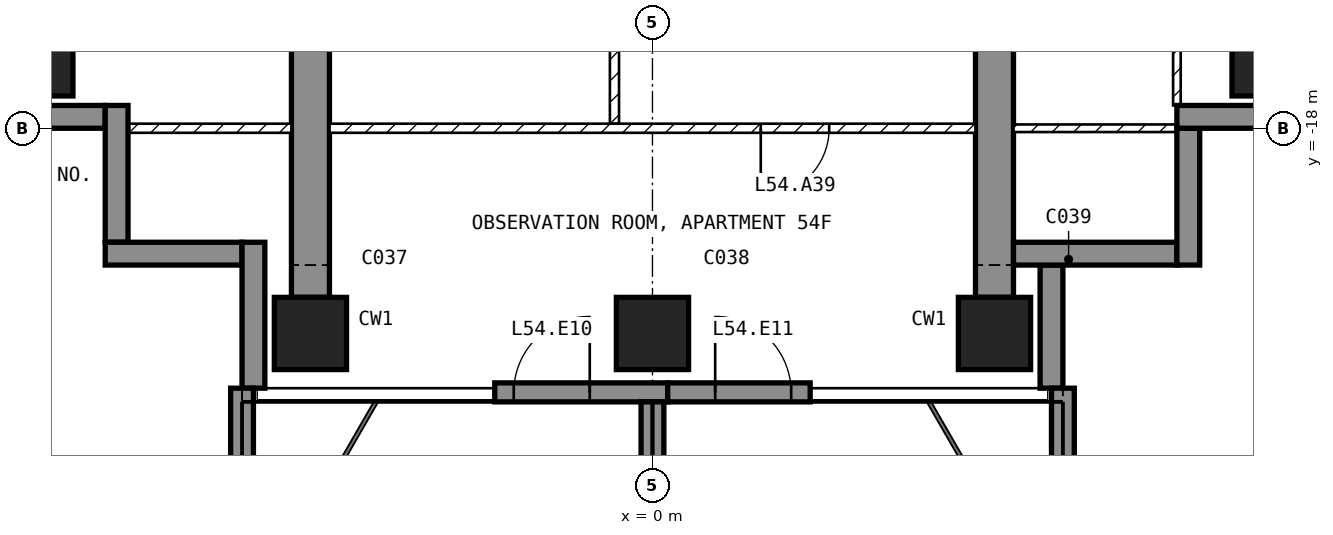
"""IFC4 building model, lengths in metres.
Left out: names, types, materials, properties, quantities, classifications, styles, units other than length and angle.
Written with IfcOpenShell. Run it as: python <this file> out.ifc"""

import sys

from ifc_helpers import new_model, si_unit, direction, frame, frame_2d, origin, origin_2d, place, context, subcontext, project, spatial, polyline, rectangle, outline, extrude, element, fill, save


model = new_model("IFC4")
c1 = context("Model", 3, precision=1e-05, world=origin(), true_north=direction((0.0, 1.0)))
c2 = subcontext(c1, "Body", "Model", "MODEL_VIEW")
j1 = project(units=[si_unit("LENGTHUNIT", "METRE"), si_unit("PLANEANGLEUNIT", "RADIAN")], contexts=[c1])
p1 = place(None, origin())
s1 = spatial("IfcSite", under=j1, at=p1, CompositionType="ELEMENT")
p2 = place(p1, origin())
s2 = spatial("IfcBuilding", under=s1, at=p2, CompositionType="ELEMENT")
p3 = place(p2, frame((0.0, 0.0, 215.6)))
s3 = spatial("IfcBuildingStorey", under=s2, at=p3, CompositionType="ELEMENT", Elevation=215.6)
for number, where, z_axis, x_axis in (
    (1, (-8.1, -17.1, -0.25), (0.0, 0.0, 1.0), (1.0, 0.0, 0.0)),
    (2, (-4.5, -20.7, -0.25), (0.0, 0.0, 1.0), (1.0, 0.0, 0.0)),
    (3, (0.0, -20.7, -0.25), (0.0, 0.0, 1.0), (1.0, 0.0, 0.0)),
    (4, (4.5, -20.7, -0.25), (0.0, 0.0, 1.0), (1.0, 0.0, 0.0)),
    (5, (8.1, -17.1, -0.25), (0.0, 0.0, 1.0), (1.0, 0.0, 0.0)),
):
    element("IfcColumn", number, at=place(p3, frame(where, z_axis=z_axis, x_axis=x_axis)), inside=s3, PredefinedType="COLUMN", context=c2, shape_type="SweptSolid", body=[
        extrude(rectangle(XDim=0.95, YDim=0.95, at=origin_2d()), origin(), (0.0, 0.0, 1.0), 3.5),
    ])
for number, where, z_axis, x_axis in (
    (6, (-4.75, -20.225, -0.25), (1.0, 0.0, 0.0), (0.0, 1.0, 0.0)),
    (7, (4.25, -20.225, -0.25), (1.0, 0.0, 0.0), (0.0, 1.0, 0.0)),
):
    element("IfcWall", number, at=place(p3, frame(where, z_axis=z_axis, x_axis=x_axis)), inside=s3, PredefinedType="SHEAR", context=c2, shape_type="SweptSolid", body=[
        extrude(outline(polyline([(0.0, 0.0), (6.725, 0.0), (6.725, 2.65), (9.125, 2.65), (9.125, 0.0), (11.225, 0.0), (11.225, 3.5), (0.0, 3.5), (0.0, 0.0)])), origin(), (0.0, 0.0, 1.0), 0.5),
    ])
p4 = place(p3, frame((-2.075, -21.475, 0.0), z_axis=(0.0, 0.0, 1.0), x_axis=(1.0, 0.0, 0.0)))
e8 = element("IfcWall", 8, at=p4, inside=s3, PredefinedType="SOLIDWALL", context=c2, shape_type="SweptSolid", body=[
    extrude(rectangle(XDim=2.275, YDim=0.25, at=frame_2d((1.137, 0.0))), origin(), (0.0, 0.0, 1.0), 3.25),
])
p5 = place(p4, frame((0.25, 0.0, 0.0)))
e9 = element("IfcOpeningElement", 9, at=p5, cuts=e8, PredefinedType="OPENING", context=c2, shape_type="SweptSolid", body=[
    extrude(rectangle(XDim=1.0, YDim=2.4, at=frame_2d((0.5, 1.2))), frame((0.0, 0.135, 0.0), z_axis=(0.0, -1.0, 0.0), x_axis=(1.0, 0.0, 0.0)), (0.0, 0.0, 1.0), 0.27),
])
p6 = place(p3, frame((0.2, -21.475, 0.0), z_axis=(0.0, 0.0, 1.0), x_axis=(1.0, 0.0, 0.0)))
e10 = element("IfcWall", 10, at=p6, inside=s3, PredefinedType="SOLIDWALL", context=c2, shape_type="SweptSolid", body=[
    extrude(rectangle(XDim=1.875, YDim=0.25, at=frame_2d((0.938, 0.0))), origin(), (0.0, 0.0, 1.0), 3.25),
])
p7 = place(p6, frame((0.625, 0.0, 0.0)))
e11 = element("IfcOpeningElement", 11, at=p7, cuts=e10, PredefinedType="OPENING", context=c2, shape_type="SweptSolid", body=[
    extrude(rectangle(XDim=1.0, YDim=2.4, at=frame_2d((0.5, 1.2))), frame((0.0, 0.135, 0.0), z_axis=(0.0, -1.0, 0.0), x_axis=(1.0, 0.0, 0.0)), (0.0, 0.0, 1.0), 0.27),
])
p8 = place(p3, frame((5.25, -21.42, 0.0), z_axis=(0.0, 0.0, 1.0), x_axis=(0.0, 1.0, 0.0)))
e12 = element("IfcWall", 12, at=p8, inside=s3, PredefinedType="SOLIDWALL", context=c2, shape_type="SweptSolid", body=[
    extrude(rectangle(XDim=1.62, YDim=0.3, at=frame_2d((0.81, 0.0))), origin(), (0.0, 0.0, 1.0), 3.25),
])
p9 = place(p3, frame((4.75, -19.65, 0.0), z_axis=(0.0, 0.0, 1.0), x_axis=(1.0, 0.0, 0.0)))
e13 = element("IfcWall", 13, at=p9, inside=s3, PredefinedType="SOLIDWALL", context=c2, shape_type="SweptSolid", body=[
    extrude(rectangle(XDim=2.15, YDim=0.3, at=frame_2d((1.075, 0.0))), origin(), (0.0, 0.0, 1.0), 3.25),
])
p10 = place(p3, frame((7.05, -19.8, 0.0), z_axis=(0.0, 0.0, 1.0), x_axis=(0.0, 1.0, 0.0)))
e14 = element("IfcWall", 14, at=p10, inside=s3, PredefinedType="SOLIDWALL", context=c2, shape_type="SweptSolid", body=[
    extrude(rectangle(XDim=1.8, YDim=0.3, at=frame_2d((0.9, 0.0))), origin(), (0.0, 0.0, 1.0), 3.25),
])
p11 = place(p3, frame((6.9, -17.85, 0.0), z_axis=(0.0, 0.0, 1.0), x_axis=(1.0, 0.0, 0.0)))
e15 = element("IfcWall", 15, at=p11, inside=s3, PredefinedType="SOLIDWALL", context=c2, shape_type="SweptSolid", body=[
    extrude(rectangle(XDim=1.85, YDim=0.3, at=frame_2d((0.925, 0.0))), origin(), (0.0, 0.0, 1.0), 3.25),
])
p12 = place(p3, frame((-8.75, -17.85, 0.0), z_axis=(0.0, 0.0, 1.0), x_axis=(1.0, 0.0, 0.0)))
e16 = element("IfcWall", 16, at=p12, inside=s3, PredefinedType="SOLIDWALL", context=c2, shape_type="SweptSolid", body=[
    extrude(rectangle(XDim=1.55, YDim=0.3, at=frame_2d((0.775, 0.0))), origin(), (0.0, 0.0, 1.0), 3.25),
])
for number, where, z_axis, x_axis in (
    (17, (-7.05, -17.7, 0.0), (0.0, 0.0, 1.0), (0.0, -1.0, 0.0)),
    (18, (-7.2, -19.65, 0.0), (0.0, 0.0, 1.0), (1.0, 0.0, 0.0)),
):
    element("IfcWall", number, at=place(p3, frame(where, z_axis=z_axis, x_axis=x_axis)), inside=s3, PredefinedType="SOLIDWALL", context=c2, shape_type="SweptSolid", body=[
        extrude(rectangle(XDim=1.8, YDim=0.3, at=frame_2d((0.9, 0.0))), origin(), (0.0, 0.0, 1.0), 3.25),
    ])
p13 = place(p3, frame((-5.25, -19.5, 0.0), z_axis=(0.0, 0.0, 1.0), x_axis=(0.0, -1.0, 0.0)))
e19 = element("IfcWall", 19, at=p13, inside=s3, PredefinedType="SOLIDWALL", context=c2, shape_type="SweptSolid", body=[
    extrude(rectangle(XDim=1.92, YDim=0.3, at=frame_2d((0.96, 0.0))), origin(), (0.0, 0.0, 1.0), 3.25),
])
p14 = place(p3, frame((-5.4, -21.42, 0.0), z_axis=(0.0, 0.0, 1.0), x_axis=(0.0, -1.0, 0.0)))
e20 = element("IfcWall", 20, at=p14, inside=s3, PredefinedType="SOLIDWALL", context=c2, shape_type="SweptSolid", body=[
    extrude(rectangle(XDim=2.88, YDim=0.3, at=frame_2d((1.44, 0.0))), origin(), (0.0, 0.0, 1.0), 3.25),
])
p15 = place(p3, frame((0.0, -21.6, 0.0), z_axis=(0.0, 0.0, 1.0), x_axis=(0.0, -1.0, 0.0)))
e21 = element("IfcWall", 21, at=p15, inside=s3, PredefinedType="SOLIDWALL", context=c2, shape_type="SweptSolid", body=[
    extrude(rectangle(XDim=2.7, YDim=0.3, at=frame_2d((1.35, 0.0))), origin(), (0.0, 0.0, 1.0), 3.25),
])
p16 = place(p3, frame((5.4, -21.42, 0.0), z_axis=(0.0, 0.0, 1.0), x_axis=(0.0, -1.0, 0.0)))
e22 = element("IfcWall", 22, at=p16, inside=s3, PredefinedType="SOLIDWALL", context=c2, shape_type="SweptSolid", body=[
    extrude(rectangle(XDim=2.88, YDim=0.3, at=frame_2d((1.44, 0.0))), origin(), (0.0, 0.0, 1.0), 3.25),
])
p17 = place(p3, frame((-0.5, -17.94, 0.0), z_axis=(0.0, 0.0, 1.0), x_axis=(0.0, 1.0, 0.0)))
e23 = element("IfcWall", 23, at=p17, inside=s3, PredefinedType="PARTITIONING", context=c2, shape_type="SweptSolid", body=[
    extrude(rectangle(XDim=2.88, YDim=0.12, at=frame_2d((1.44, 0.0))), origin(), (0.0, 0.0, 1.0), 3.25),
])
p18 = place(p17, frame((0.99, 0.0, 0.0)))
e24 = element("IfcOpeningElement", 24, at=p18, cuts=e23, PredefinedType="OPENING", context=c2, shape_type="SweptSolid", body=[
    extrude(rectangle(XDim=0.9, YDim=2.1, at=frame_2d((0.45, 1.05))), frame((0.0, 0.07, 0.0), z_axis=(0.0, -1.0, 0.0), x_axis=(1.0, 0.0, 0.0)), (0.0, 0.0, 1.0), 0.14),
])
p19 = place(p3, frame((4.25, -18.0, 0.0), z_axis=(0.0, 0.0, 1.0), x_axis=(-1.0, 0.0, 0.0)))
e25 = element("IfcWall", 25, at=p19, inside=s3, PredefinedType="PARTITIONING", context=c2, shape_type="SweptSolid", body=[
    extrude(rectangle(XDim=8.5, YDim=0.12, at=frame_2d((4.25, 0.0))), origin(), (0.0, 0.0, 1.0), 3.25),
])
p20 = place(p19, frame((1.925, 0.0, 0.0)))
e26 = element("IfcOpeningElement", 26, at=p20, cuts=e25, PredefinedType="OPENING", context=c2, shape_type="SweptSolid", body=[
    extrude(rectangle(XDim=0.9, YDim=2.1, at=frame_2d((0.45, 1.05))), frame((0.0, 0.07, 0.0), z_axis=(0.0, -1.0, 0.0), x_axis=(1.0, 0.0, 0.0)), (0.0, 0.0, 1.0), 0.14),
])
p21 = place(p3, frame((6.9, -17.7, 0.0), z_axis=(0.0, 0.0, 1.0), x_axis=(0.0, 1.0, 0.0)))
e27 = element("IfcWall", 27, at=p21, inside=s3, PredefinedType="PARTITIONING", context=c2, shape_type="SweptSolid", body=[
    extrude(rectangle(XDim=3.25, YDim=0.1, at=frame_2d((1.625, 0.0))), origin(), (0.0, 0.0, 1.0), 3.25),
])
p22 = place(p21, frame((2.05, 0.0, 0.0)))
e28 = element("IfcOpeningElement", 28, at=p22, cuts=e27, PredefinedType="OPENING", context=c2, shape_type="SweptSolid", body=[
    extrude(rectangle(XDim=0.85, YDim=2.1, at=frame_2d((0.425, 1.05))), frame((0.0, 0.06, 0.0), z_axis=(0.0, -1.0, 0.0), x_axis=(1.0, 0.0, 0.0)), (0.0, 0.0, 1.0), 0.12),
])
p23 = place(p3, frame((7.12, -18.0, 0.0), z_axis=(0.0, 0.0, 1.0), x_axis=(-1.0, 0.0, 0.0)))
e29 = element("IfcWall", 29, at=p23, inside=s3, PredefinedType="PARTITIONING", context=c2, shape_type="SweptSolid", body=[
    extrude(rectangle(XDim=2.37, YDim=0.1, at=frame_2d((1.185, 0.0))), origin(), (0.0, 0.0, 1.0), 3.25),
])
p24 = place(p3, frame((-4.75, -18.0, 0.0), z_axis=(0.0, 0.0, 1.0), x_axis=(-1.0, 0.0, 0.0)))
e30 = element("IfcWall", 30, at=p24, inside=s3, PredefinedType="PARTITIONING", context=c2, shape_type="SweptSolid", body=[
    extrude(rectangle(XDim=2.37, YDim=0.12, at=frame_2d((1.185, 0.0))), origin(), (0.0, 0.0, 1.0), 3.25),
])
p25 = place(p5, origin())
e31 = element("IfcDoor", 31, at=p25, inside=s3, OperationType="SINGLE_SWING_RIGHT", PredefinedType="DOOR", context=c2, shape_type="SweptSolid", body=[
    extrude(rectangle(XDim=1.0, YDim=2.4, at=frame_2d((0.5, 1.2))), frame((0.0, 0.025, 0.0), z_axis=(0.0, -1.0, 0.0), x_axis=(1.0, 0.0, 0.0)), (0.0, 0.0, 1.0), 0.05),
])
fill(e9, e31)
p26 = place(p7, origin())
e32 = element("IfcDoor", 32, at=p26, inside=s3, OperationType="SINGLE_SWING_LEFT", PredefinedType="DOOR", context=c2, shape_type="SweptSolid", body=[
    extrude(rectangle(XDim=1.0, YDim=2.4, at=frame_2d((0.5, 1.2))), frame((0.0, 0.025, 0.0), z_axis=(0.0, -1.0, 0.0), x_axis=(1.0, 0.0, 0.0)), (0.0, 0.0, 1.0), 0.05),
])
fill(e11, e32)
p27 = place(p20, origin())
e33 = element("IfcDoor", 33, at=p27, inside=s3, OperationType="SINGLE_SWING_RIGHT", PredefinedType="DOOR", context=c2, shape_type="SweptSolid", body=[
    extrude(rectangle(XDim=0.9, YDim=2.1, at=frame_2d((0.45, 1.05))), frame((0.0, 0.025, 0.0), z_axis=(0.0, -1.0, 0.0), x_axis=(1.0, 0.0, 0.0)), (0.0, 0.0, 1.0), 0.05),
])
fill(e26, e33)
save(model, sys.argv[1])
